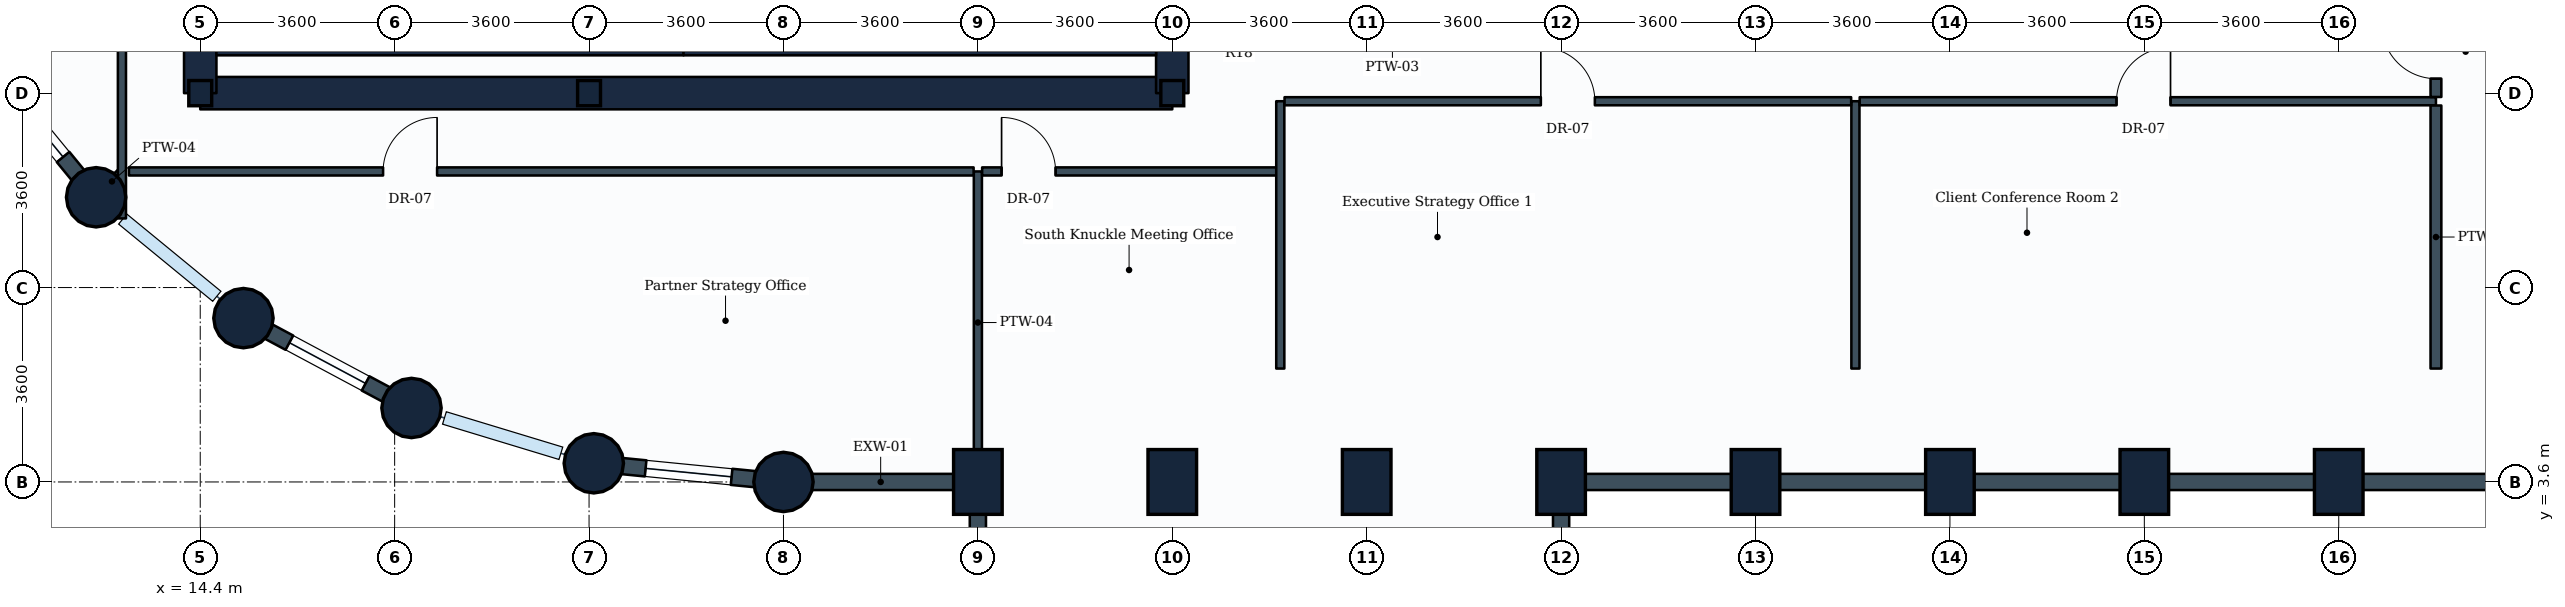
"""IFC4 building model, lengths in metres.
Left out: names, types, materials, properties, quantities, classifications, styles, units other than length and angle.
Written with IfcOpenShell. Run it as: python <this file> out.ifc"""

import sys

from ifc_helpers import new_model, si_unit, direction, frame, frame_2d, origin, origin_2d, place, context, subcontext, project, spatial, rectangle, circle, i_section, extrude, element, fill, save


model = new_model("IFC4")
c1 = context("Model", 3, precision=1e-05, world=origin(), true_north=direction((0.0, 1.0)))
c2 = subcontext(c1, "Body", "Model", "MODEL_VIEW")
j1 = project(units=[si_unit("LENGTHUNIT", "METRE"), si_unit("PLANEANGLEUNIT", "RADIAN")], contexts=[c1])
p1 = place(None, origin())
s1 = spatial("IfcSite", under=j1, at=p1, CompositionType="ELEMENT")
p2 = place(p1, origin())
s2 = spatial("IfcBuilding", under=s1, at=p2, CompositionType="ELEMENT")
p3 = place(p2, frame((0.0, 0.0, 27.9)))
s3 = spatial("IfcBuildingStorey", under=s2, at=p3, CompositionType="ELEMENT", Elevation=27.9)
p4 = place(p3, frame((12.472, 8.872, 0.0), z_axis=(0.0, 0.0, 1.0), x_axis=(1.0, 0.0, 0.0)))
e1 = element("IfcColumn", 1, at=p4, inside=s3, PredefinedType="COLUMN", context=c2, shape_type="SweptSolid", body=[
    extrude(circle(Radius=0.55, at=origin_2d()), origin(), (0.0, 0.0, 1.0), 3.9),
])
p5 = place(p3, frame((14.4, 10.8, 0.0), z_axis=(0.0, 0.0, 1.0), x_axis=(1.0, 0.0, 0.0)))
e2 = element("IfcColumn", 2, at=p5, inside=s3, PredefinedType="COLUMN", context=c2, shape_type="SweptSolid", body=[
    extrude(i_section(OverallWidth=0.424, OverallDepth=0.467, WebThickness=0.033, FlangeThickness=0.053, FilletRadius=0.015, at=origin_2d()), origin(), (0.0, 0.0, 1.0), 3.9),
])
for number, where, z_axis, x_axis in (
    (3, (15.2, 6.634, 0.0), (0.0, 0.0, 1.0), (1.0, 0.0, 0.0)),
    (4, (18.312, 4.97, 0.0), (0.0, 0.0, 1.0), (1.0, 0.0, 0.0)),
):
    element("IfcColumn", number, at=place(p3, frame(where, z_axis=z_axis, x_axis=x_axis)), inside=s3, PredefinedType="COLUMN", context=c2, shape_type="SweptSolid", body=[
        extrude(circle(Radius=0.55, at=origin_2d()), origin(), (0.0, 0.0, 1.0), 3.9),
    ])
p6 = place(p3, frame((21.6, 10.8, 0.0), z_axis=(0.0, 0.0, 1.0), x_axis=(1.0, 0.0, 0.0)))
e5 = element("IfcColumn", 5, at=p6, inside=s3, PredefinedType="COLUMN", context=c2, shape_type="SweptSolid", body=[
    extrude(i_section(OverallWidth=0.424, OverallDepth=0.467, WebThickness=0.033, FlangeThickness=0.053, FilletRadius=0.015, at=origin_2d()), origin(), (0.0, 0.0, 1.0), 3.9),
])
for number, where, z_axis, x_axis in (
    (6, (21.688, 3.946, 0.0), (0.0, 0.0, 1.0), (1.0, 0.0, 0.0)),
    (7, (25.2, 3.6, 0.0), (0.0, 0.0, 1.0), (1.0, 0.0, 0.0)),
):
    element("IfcColumn", number, at=place(p3, frame(where, z_axis=z_axis, x_axis=x_axis)), inside=s3, PredefinedType="COLUMN", context=c2, shape_type="SweptSolid", body=[
        extrude(circle(Radius=0.55, at=origin_2d()), origin(), (0.0, 0.0, 1.0), 3.9),
    ])
for number, where, z_axis, x_axis in (
    (8, (28.8, 3.6, 0.0), (0.0, 0.0, 1.0), (1.0, 0.0, 0.0)),
    (9, (32.4, 3.6, 0.0), (0.0, 0.0, 1.0), (1.0, 0.0, 0.0)),
):
    element("IfcColumn", number, at=place(p3, frame(where, z_axis=z_axis, x_axis=x_axis)), inside=s3, PredefinedType="COLUMN", context=c2, shape_type="SweptSolid", body=[
        extrude(rectangle(XDim=0.9, YDim=1.2, at=origin_2d()), origin(), (0.0, 0.0, 1.0), 3.9),
    ])
p7 = place(p3, frame((32.4, 10.8, 0.0), z_axis=(0.0, 0.0, 1.0), x_axis=(1.0, 0.0, 0.0)))
e10 = element("IfcColumn", 10, at=p7, inside=s3, PredefinedType="COLUMN", context=c2, shape_type="SweptSolid", body=[
    extrude(i_section(OverallWidth=0.424, OverallDepth=0.467, WebThickness=0.033, FlangeThickness=0.053, FilletRadius=0.015, at=origin_2d()), origin(), (0.0, 0.0, 1.0), 3.9),
])
for number, where, z_axis, x_axis in (
    (11, (36.0, 3.6, 0.0), (0.0, 0.0, 1.0), (1.0, 0.0, 0.0)),
    (12, (39.6, 3.6, 0.0), (0.0, 0.0, 1.0), (1.0, 0.0, 0.0)),
    (13, (43.2, 3.6, 0.0), (0.0, 0.0, 1.0), (1.0, 0.0, 0.0)),
    (14, (46.8, 3.6, 0.0), (0.0, 0.0, 1.0), (1.0, 0.0, 0.0)),
    (15, (50.4, 3.6, 0.0), (0.0, 0.0, 1.0), (1.0, 0.0, 0.0)),
    (16, (54.0, 3.6, 0.0), (0.0, 0.0, 1.0), (1.0, 0.0, 0.0)),
):
    element("IfcColumn", number, at=place(p3, frame(where, z_axis=z_axis, x_axis=x_axis)), inside=s3, PredefinedType="COLUMN", context=c2, shape_type="SweptSolid", body=[
        extrude(rectangle(XDim=0.9, YDim=1.2, at=origin_2d()), origin(), (0.0, 0.0, 1.0), 3.9),
    ])
p8 = place(p3, frame((28.8, 3.6, 0.0), z_axis=(0.0, 0.0, 1.0), x_axis=(-1.0, 0.0, 0.0)))
e17 = element("IfcWall", 17, at=p8, inside=s3, PredefinedType="STANDARD", context=c2, shape_type="SweptSolid", body=[
    extrude(rectangle(XDim=3.6, YDim=0.3, at=frame_2d((1.8, 0.0))), origin(), (0.0, 0.0, 1.0), 2.93),
])
for number, where, z_axis, x_axis in (
    (18, (28.8, 1.5, 0.0), (0.0, 0.0, 1.0), (0.0, 1.0, 0.0)),
    (19, (39.6, 3.6, 0.0), (0.0, 0.0, 1.0), (0.0, -1.0, 0.0)),
):
    element("IfcWall", number, at=place(p3, frame(where, z_axis=z_axis, x_axis=x_axis)), inside=s3, PredefinedType="STANDARD", context=c2, shape_type="SweptSolid", body=[
        extrude(rectangle(XDim=2.1, YDim=0.3, at=frame_2d((1.05, 0.0))), origin(), (0.0, 0.0, 1.0), 2.93),
    ])
p9 = place(p3, frame((43.2, 3.6, 0.0), z_axis=(0.0, 0.0, 1.0), x_axis=(-1.0, 0.0, 0.0)))
e20 = element("IfcWall", 20, at=p9, inside=s3, PredefinedType="STANDARD", context=c2, shape_type="SweptSolid", body=[
    extrude(rectangle(XDim=3.6, YDim=0.3, at=frame_2d((1.8, 0.0))), origin(), (0.0, 0.0, 1.0), 2.93),
])
p10 = place(p3, frame((46.8, 3.6, 0.0), z_axis=(0.0, 0.0, 1.0), x_axis=(-1.0, 0.0, 0.0)))
e21 = element("IfcWall", 21, at=p10, inside=s3, PredefinedType="STANDARD", context=c2, shape_type="SweptSolid", body=[
    extrude(rectangle(XDim=3.6, YDim=0.3, at=frame_2d((1.8, 0.0))), origin(), (0.0, 0.0, 1.0), 2.93),
])
p11 = place(p3, frame((50.4, 3.6, 0.0), z_axis=(0.0, 0.0, 1.0), x_axis=(-1.0, 0.0, 0.0)))
e22 = element("IfcWall", 22, at=p11, inside=s3, PredefinedType="STANDARD", context=c2, shape_type="SweptSolid", body=[
    extrude(rectangle(XDim=3.6, YDim=0.3, at=frame_2d((1.8, 0.0))), origin(), (0.0, 0.0, 1.0), 2.93),
])
for number, where, z_axis, x_axis in (
    (23, (54.0, 3.6, 0.0), (0.0, 0.0, 1.0), (-1.0, 0.0, 0.0)),
    (24, (57.6, 3.6, 0.0), (0.0, 0.0, 1.0), (-1.0, 0.0, 0.0)),
):
    element("IfcWall", number, at=place(p3, frame(where, z_axis=z_axis, x_axis=x_axis)), inside=s3, PredefinedType="STANDARD", context=c2, shape_type="SweptSolid", body=[
        extrude(rectangle(XDim=3.6, YDim=0.3, at=frame_2d((1.8, 0.0))), origin(), (0.0, 0.0, 1.0), 2.93),
    ])
p12 = place(p3, frame((12.472, 8.872, 0.0), z_axis=(0.0, 0.0, 1.0), x_axis=(-0.634258295121, 0.773121216285, 0.0)))
e25 = element("IfcWall", 25, at=p12, inside=s3, PredefinedType="STANDARD", context=c2, shape_type="SweptSolid", body=[
    extrude(rectangle(XDim=3.529, YDim=0.3, at=frame_2d((1.764, 0.0))), origin(), (0.0, 0.0, 1.0), 2.93),
])
p13 = place(p12, frame((0.964, 0.0, 0.85)))
e26 = element("IfcOpeningElement", 26, at=p13, cuts=e25, PredefinedType="OPENING", context=c2, shape_type="SweptSolid", body=[
    extrude(rectangle(XDim=1.6, YDim=1.35, at=frame_2d((0.8, 0.675))), frame((0.0, 0.16, 0.0), z_axis=(0.0, -1.0, 0.0), x_axis=(1.0, 0.0, 0.0)), (0.0, 0.0, 1.0), 0.32),
])
p14 = place(p3, frame((18.312, 4.97, 0.0), z_axis=(0.0, 0.0, 1.0), x_axis=(-0.881846862014, 0.471535907389, 0.0)))
e27 = element("IfcWall", 27, at=p14, inside=s3, PredefinedType="STANDARD", context=c2, shape_type="SweptSolid", body=[
    extrude(rectangle(XDim=3.529, YDim=0.3, at=frame_2d((1.765, 0.0))), origin(), (0.0, 0.0, 1.0), 2.93),
])
p15 = place(p14, frame((0.964, 0.0, 0.85)))
e28 = element("IfcOpeningElement", 28, at=p15, cuts=e27, PredefinedType="OPENING", context=c2, shape_type="SweptSolid", body=[
    extrude(rectangle(XDim=1.6, YDim=1.35, at=frame_2d((0.8, 0.675))), frame((0.0, 0.16, 0.0), z_axis=(0.0, -1.0, 0.0), x_axis=(1.0, 0.0, 0.0)), (0.0, 0.0, 1.0), 0.32),
])
p16 = place(p3, frame((25.2, 3.6, 0.0), z_axis=(0.0, 0.0, 1.0), x_axis=(-0.995183369056, 0.098030923459, 0.0)))
e29 = element("IfcWall", 29, at=p16, inside=s3, PredefinedType="STANDARD", context=c2, shape_type="SweptSolid", body=[
    extrude(rectangle(XDim=3.529, YDim=0.3, at=frame_2d((1.765, 0.0))), origin(), (0.0, 0.0, 1.0), 2.93),
])
p17 = place(p16, frame((0.965, 0.0, 0.85)))
e30 = element("IfcOpeningElement", 30, at=p17, cuts=e29, PredefinedType="OPENING", context=c2, shape_type="SweptSolid", body=[
    extrude(rectangle(XDim=1.6, YDim=1.35, at=frame_2d((0.8, 0.675))), frame((0.0, 0.16, 0.0), z_axis=(0.0, -1.0, 0.0), x_axis=(1.0, 0.0, 0.0)), (0.0, 0.0, 1.0), 0.32),
])
p18 = place(p3, frame((14.4, 10.8, 0.0), z_axis=(0.0, 0.0, 1.0), x_axis=(1.0, 0.0, 0.0)))
e31 = element("IfcWall", 31, at=p18, inside=s3, PredefinedType="SHEAR", context=c2, shape_type="SweptSolid", body=[
    extrude(rectangle(XDim=18.0, YDim=0.6, at=frame_2d((9.0, 0.0))), origin(), (0.0, 0.0, 1.0), 3.65),
])
p19 = place(p3, frame((14.4, 10.8, 0.0), z_axis=(0.0, 0.0, 1.0), x_axis=(0.0, 1.0, 0.0)))
e32 = element("IfcWall", 32, at=p19, inside=s3, PredefinedType="SHEAR", context=c2, shape_type="SweptSolid", body=[
    extrude(rectangle(XDim=14.4, YDim=0.6, at=frame_2d((7.2, 0.0))), origin(), (0.0, 0.0, 1.0), 3.65),
])
p20 = place(p19, frame((11.05, 0.0, 0.0)))
e33 = element("IfcOpeningElement", 33, at=p20, cuts=e32, PredefinedType="OPENING", context=c2, shape_type="SweptSolid", body=[
    extrude(rectangle(XDim=1.1, YDim=2.1, at=frame_2d((0.55, 1.05))), frame((0.0, 0.31, 0.0), z_axis=(0.0, -1.0, 0.0), x_axis=(1.0, 0.0, 0.0)), (0.0, 0.0, 1.0), 0.62),
])
p21 = place(p19, frame((4.9, 0.0, 0.0)))
e34 = element("IfcOpeningElement", 34, at=p21, cuts=e32, PredefinedType="OPENING", context=c2, shape_type="SweptSolid", body=[
    extrude(rectangle(XDim=1.2, YDim=2.1, at=frame_2d((0.6, 1.05))), frame((0.0, 0.31, 0.0), z_axis=(0.0, -1.0, 0.0), x_axis=(1.0, 0.0, 0.0)), (0.0, 0.0, 1.0), 0.62),
])
p22 = place(p3, frame((32.4, 10.8, 0.0), z_axis=(0.0, 0.0, 1.0), x_axis=(0.0, 1.0, 0.0)))
e35 = element("IfcWall", 35, at=p22, inside=s3, PredefinedType="SHEAR", context=c2, shape_type="SweptSolid", body=[
    extrude(rectangle(XDim=14.4, YDim=0.6, at=frame_2d((7.2, 0.0))), origin(), (0.0, 0.0, 1.0), 3.65),
])
p23 = place(p22, frame((4.35, 0.0, 0.0)))
e36 = element("IfcOpeningElement", 36, at=p23, cuts=e35, PredefinedType="OPENING", context=c2, shape_type="SweptSolid", body=[
    extrude(rectangle(XDim=1.2, YDim=2.1, at=frame_2d((0.6, 1.05))), frame((0.0, 0.31, 0.0), z_axis=(0.0, -1.0, 0.0), x_axis=(1.0, 0.0, 0.0)), (0.0, 0.0, 1.0), 0.62),
])
p24 = place(p22, frame((10.0, 0.0, 0.0)))
e37 = element("IfcOpeningElement", 37, at=p24, cuts=e35, PredefinedType="OPENING", context=c2, shape_type="SweptSolid", body=[
    extrude(rectangle(XDim=1.2, YDim=2.1, at=frame_2d((0.6, 1.05))), frame((0.0, 0.31, 0.0), z_axis=(0.0, -1.0, 0.0), x_axis=(1.0, 0.0, 0.0)), (0.0, 0.0, 1.0), 0.62),
])
p25 = place(p3, frame((14.7, 11.625, 0.0), z_axis=(0.0, 0.0, 1.0), x_axis=(1.0, 0.0, 0.0)))
e38 = element("IfcWall", 38, at=p25, inside=s3, PredefinedType="SHEAR", context=c2, shape_type="SweptSolid", body=[
    extrude(rectangle(XDim=8.65, YDim=0.25, at=frame_2d((4.325, 0.0))), origin(), (0.0, 0.0, 1.0), 3.65),
])
p26 = place(p3, frame((23.35, 11.625, 0.0), z_axis=(0.0, 0.0, 1.0), x_axis=(1.0, 0.0, 0.0)))
e39 = element("IfcWall", 39, at=p26, inside=s3, PredefinedType="SHEAR", context=c2, shape_type="SweptSolid", body=[
    extrude(rectangle(XDim=8.75, YDim=0.25, at=frame_2d((4.375, 0.0))), origin(), (0.0, 0.0, 1.0), 3.65),
])
p27 = place(p3, frame((28.8, 9.35, 0.0), z_axis=(0.0, 0.0, 1.0), x_axis=(0.0, -1.0, 0.0)))
e40 = element("IfcWall", 40, at=p27, inside=s3, PredefinedType="PARTITIONING", context=c2, shape_type="SweptSolid", body=[
    extrude(rectangle(XDim=5.596, YDim=0.15, at=frame_2d((2.798, 0.0))), origin(), (0.0, 0.0, 1.0), 3.635),
])
p28 = place(p3, frame((12.95, 9.35, 0.0), z_axis=(0.0, 0.0, 1.0), x_axis=(-0.707106781187, -0.707106781187, 0.0)))
e41 = element("IfcWall", 41, at=p28, inside=s3, PredefinedType="PARTITIONING", context=c2, shape_type="SweptSolid", body=[
    extrude(rectangle(XDim=0.522, YDim=0.15, at=frame_2d((0.261, 0.0))), origin(), (0.0, 0.0, 1.0), 3.08),
])
p29 = place(p3, frame((12.95, 8.48, 0.0), z_axis=(0.0, 0.0, 1.0), x_axis=(0.0, 1.0, 0.0)))
e42 = element("IfcWall", 42, at=p29, inside=s3, PredefinedType="PARTITIONING", context=c2, shape_type="SweptSolid", body=[
    extrude(rectangle(XDim=16.641, YDim=0.15, at=frame_2d((8.321, 0.0))), origin(), (0.0, 0.0, 1.0), 2.93),
])
p30 = place(p29, frame((7.86, 0.0, 0.0)))
e43 = element("IfcOpeningElement", 43, at=p30, cuts=e42, PredefinedType="OPENING", context=c2, shape_type="SweptSolid", body=[
    extrude(rectangle(XDim=1.0, YDim=2.1, at=frame_2d((0.5, 1.05))), frame((0.0, 0.085, 0.0), z_axis=(0.0, -1.0, 0.0), x_axis=(1.0, 0.0, 0.0)), (0.0, 0.0, 1.0), 0.17),
])
p31 = place(p3, frame((13.08, 9.35, 0.0), z_axis=(0.0, 0.0, 1.0), x_axis=(1.0, 0.0, 0.0)))
e44 = element("IfcWall", 44, at=p31, inside=s3, PredefinedType="PARTITIONING", context=c2, shape_type="SweptSolid", body=[
    extrude(rectangle(XDim=15.641, YDim=0.15, at=frame_2d((7.82, 0.0))), origin(), (0.0, 0.0, 1.0), 3.04),
])
p32 = place(p31, frame((4.706, 0.0, 0.0)))
e45 = element("IfcOpeningElement", 45, at=p32, cuts=e44, PredefinedType="OPENING", context=c2, shape_type="SweptSolid", body=[
    extrude(rectangle(XDim=1.0, YDim=2.1, at=frame_2d((0.5, 1.05))), frame((0.0, 0.085, 0.0), z_axis=(0.0, -1.0, 0.0), x_axis=(1.0, 0.0, 0.0)), (0.0, 0.0, 1.0), 0.17),
])
p33 = place(p3, frame((28.879, 9.35, 0.0), z_axis=(0.0, 0.0, 1.0), x_axis=(1.0, 0.0, 0.0)))
e46 = element("IfcWall", 46, at=p33, inside=s3, PredefinedType="PARTITIONING", context=c2, shape_type="SweptSolid", body=[
    extrude(rectangle(XDim=5.521, YDim=0.15, at=frame_2d((2.76, 0.0))), origin(), (0.0, 0.0, 1.0), 3.635),
])
p34 = place(p33, frame((0.36, 0.0, 0.0)))
e47 = element("IfcOpeningElement", 47, at=p34, cuts=e46, PredefinedType="OPENING", context=c2, shape_type="SweptSolid", body=[
    extrude(rectangle(XDim=1.0, YDim=2.1, at=frame_2d((0.5, 1.05))), frame((0.0, 0.085, 0.0), z_axis=(0.0, -1.0, 0.0), x_axis=(1.0, 0.0, 0.0)), (0.0, 0.0, 1.0), 0.17),
])
p35 = place(p3, frame((34.4, 5.7, 0.0), z_axis=(0.0, 0.0, 1.0), x_axis=(0.0, 1.0, 0.0)))
e48 = element("IfcWall", 48, at=p35, inside=s3, PredefinedType="PARTITIONING", context=c2, shape_type="SweptSolid", body=[
    extrude(rectangle(XDim=4.95, YDim=0.15, at=frame_2d((2.475, 0.0))), origin(), (0.0, 0.0, 1.0), 3.635),
])
p36 = place(p3, frame((45.05, 5.7, 0.0), z_axis=(0.0, 0.0, 1.0), x_axis=(0.0, 1.0, 0.0)))
e49 = element("IfcWall", 49, at=p36, inside=s3, PredefinedType="PARTITIONING", context=c2, shape_type="SweptSolid", body=[
    extrude(rectangle(XDim=4.95, YDim=0.15, at=frame_2d((2.475, 0.0))), origin(), (0.0, 0.0, 1.0), 3.18),
])
p37 = place(p3, frame((34.479, 10.65, 0.0), z_axis=(0.0, 0.0, 1.0), x_axis=(1.0, 0.0, 0.0)))
e50 = element("IfcWall", 50, at=p37, inside=s3, PredefinedType="PARTITIONING", context=c2, shape_type="SweptSolid", body=[
    extrude(rectangle(XDim=10.492, YDim=0.15, at=frame_2d((5.246, 0.0))), origin(), (0.0, 0.0, 1.0), 3.03),
])
p38 = place(p37, frame((4.746, 0.0, 0.0)))
e51 = element("IfcOpeningElement", 51, at=p38, cuts=e50, PredefinedType="OPENING", context=c2, shape_type="SweptSolid", body=[
    extrude(rectangle(XDim=1.0, YDim=2.1, at=frame_2d((0.5, 1.05))), frame((0.0, 0.085, 0.0), z_axis=(0.0, -1.0, 0.0), x_axis=(1.0, 0.0, 0.0)), (0.0, 0.0, 1.0), 0.17),
])
p39 = place(p3, frame((45.129, 10.65, 0.0), z_axis=(0.0, 0.0, 1.0), x_axis=(1.0, 0.0, 0.0)))
e52 = element("IfcWall", 52, at=p39, inside=s3, PredefinedType="PARTITIONING", context=c2, shape_type="SweptSolid", body=[
    extrude(rectangle(XDim=10.671, YDim=0.15, at=frame_2d((5.335, 0.0))), origin(), (0.0, 0.0, 1.0), 3.03),
])
p40 = place(p39, frame((4.756, 0.0, 0.0)))
e53 = element("IfcOpeningElement", 53, at=p40, cuts=e52, PredefinedType="OPENING", context=c2, shape_type="SweptSolid", body=[
    extrude(rectangle(XDim=1.0, YDim=2.1, at=frame_2d((0.5, 1.05))), frame((0.0, 0.085, 0.0), z_axis=(0.0, -1.0, 0.0), x_axis=(1.0, 0.0, 0.0)), (0.0, 0.0, 1.0), 0.17),
])
p41 = place(p3, frame((55.8, 5.7, 0.0), z_axis=(0.0, 0.0, 1.0), x_axis=(0.0, 1.0, 0.0)))
e54 = element("IfcWall", 54, at=p41, inside=s3, PredefinedType="PARTITIONING", context=c2, shape_type="SweptSolid", body=[
    extrude(rectangle(XDim=4.871, YDim=0.2, at=frame_2d((2.436, 0.0))), origin(), (0.0, 0.0, 1.0), 3.635),
])
p42 = place(p3, frame((55.8, 10.729, 0.0), z_axis=(0.0, 0.0, 1.0), x_axis=(0.0, 1.0, 0.0)))
e55 = element("IfcWall", 55, at=p42, inside=s3, PredefinedType="PARTITIONING", context=c2, shape_type="SweptSolid", body=[
    extrude(rectangle(XDim=1.692, YDim=0.2, at=frame_2d((0.846, 0.0))), origin(), (0.0, 0.0, 1.0), 3.635),
])
p43 = place(p42, frame((0.339, 0.0, 0.0)))
e56 = element("IfcOpeningElement", 56, at=p43, cuts=e55, PredefinedType="OPENING", context=c2, shape_type="SweptSolid", body=[
    extrude(rectangle(XDim=1.0, YDim=2.1, at=frame_2d((0.5, 1.05))), frame((0.0, 0.11, 0.0), z_axis=(0.0, -1.0, 0.0), x_axis=(1.0, 0.0, 0.0)), (0.0, 0.0, 1.0), 0.22),
])
p44 = place(p13, origin())
e57 = element("IfcWindow", 57, at=p44, inside=s3, PartitioningType="SINGLE_PANEL", PredefinedType="WINDOW", context=c2, shape_type="SweptSolid", body=[
    extrude(rectangle(XDim=1.6, YDim=1.35, at=frame_2d((0.8, 0.675))), frame((0.0, 0.03, 0.0), z_axis=(0.0, -1.0, 0.0), x_axis=(1.0, 0.0, 0.0)), (0.0, 0.0, 1.0), 0.06),
])
fill(e26, e57)
p45 = place(p15, origin())
e58 = element("IfcWindow", 58, at=p45, inside=s3, PartitioningType="SINGLE_PANEL", PredefinedType="WINDOW", context=c2, shape_type="SweptSolid", body=[
    extrude(rectangle(XDim=1.6, YDim=1.35, at=frame_2d((0.8, 0.675))), frame((0.0, 0.03, 0.0), z_axis=(0.0, -1.0, 0.0), x_axis=(1.0, 0.0, 0.0)), (0.0, 0.0, 1.0), 0.06),
])
fill(e28, e58)
p46 = place(p17, origin())
e59 = element("IfcWindow", 59, at=p46, inside=s3, PartitioningType="SINGLE_PANEL", PredefinedType="WINDOW", context=c2, shape_type="SweptSolid", body=[
    extrude(rectangle(XDim=1.6, YDim=1.35, at=frame_2d((0.8, 0.675))), frame((0.0, 0.03, 0.0), z_axis=(0.0, -1.0, 0.0), x_axis=(1.0, 0.0, 0.0)), (0.0, 0.0, 1.0), 0.06),
])
fill(e30, e59)
p47 = place(p32, origin())
e60 = element("IfcDoor", 60, at=p47, inside=s3, OperationType="SINGLE_SWING_RIGHT", PredefinedType="DOOR", context=c2, shape_type="SweptSolid", body=[
    extrude(rectangle(XDim=1.0, YDim=2.1, at=frame_2d((0.5, 1.05))), frame((0.0, 0.025, 0.0), z_axis=(0.0, -1.0, 0.0), x_axis=(1.0, 0.0, 0.0)), (0.0, 0.0, 1.0), 0.05),
])
fill(e45, e60)
p48 = place(p34, origin())
e61 = element("IfcDoor", 61, at=p48, inside=s3, OperationType="SINGLE_SWING_LEFT", PredefinedType="DOOR", context=c2, shape_type="SweptSolid", body=[
    extrude(rectangle(XDim=1.0, YDim=2.1, at=frame_2d((0.5, 1.05))), frame((0.0, 0.025, 0.0), z_axis=(0.0, -1.0, 0.0), x_axis=(1.0, 0.0, 0.0)), (0.0, 0.0, 1.0), 0.05),
])
fill(e47, e61)
p49 = place(p38, origin())
e62 = element("IfcDoor", 62, at=p49, inside=s3, OperationType="SINGLE_SWING_LEFT", PredefinedType="DOOR", context=c2, shape_type="SweptSolid", body=[
    extrude(rectangle(XDim=1.0, YDim=2.1, at=frame_2d((0.5, 1.05))), frame((0.0, 0.025, 0.0), z_axis=(0.0, -1.0, 0.0), x_axis=(1.0, 0.0, 0.0)), (0.0, 0.0, 1.0), 0.05),
])
fill(e51, e62)
p50 = place(p40, origin())
e63 = element("IfcDoor", 63, at=p50, inside=s3, OperationType="SINGLE_SWING_RIGHT", PredefinedType="DOOR", context=c2, shape_type="SweptSolid", body=[
    extrude(rectangle(XDim=1.0, YDim=2.1, at=frame_2d((0.5, 1.05))), frame((0.0, 0.025, 0.0), z_axis=(0.0, -1.0, 0.0), x_axis=(1.0, 0.0, 0.0)), (0.0, 0.0, 1.0), 0.05),
])
fill(e53, e63)
p51 = place(p43, origin())
e64 = element("IfcDoor", 64, at=p51, inside=s3, OperationType="SINGLE_SWING_RIGHT", PredefinedType="DOOR", context=c2, shape_type="SweptSolid", body=[
    extrude(rectangle(XDim=1.0, YDim=2.1, at=frame_2d((0.5, 1.05))), frame((0.0, 0.025, 0.0), z_axis=(0.0, -1.0, 0.0), x_axis=(1.0, 0.0, 0.0)), (0.0, 0.0, 1.0), 0.05),
])
fill(e56, e64)
save(model, sys.argv[1])
